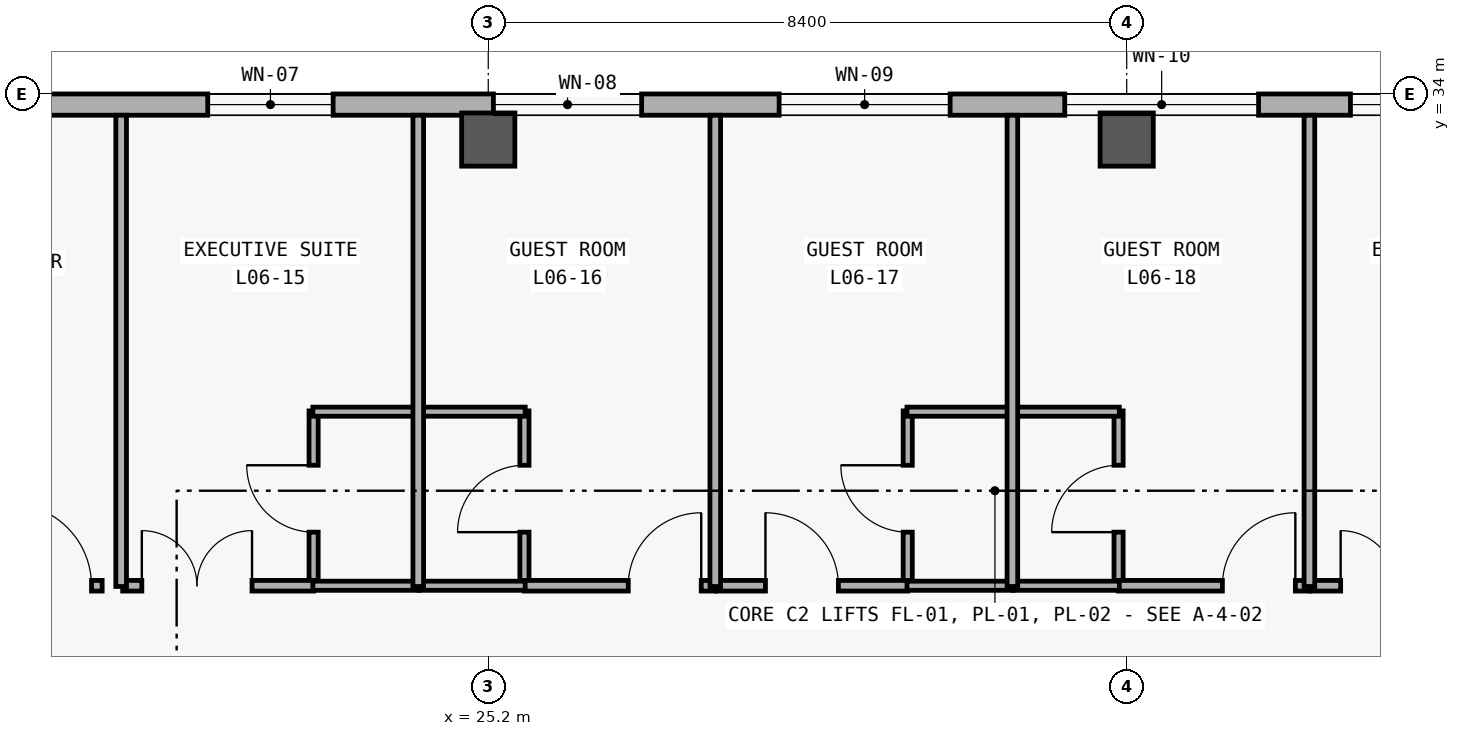
"""IFC4 building model, lengths in metres.
Left out: names, types, materials, properties, quantities, classifications, styles, units other than length and angle.
Written with IfcOpenShell. Run it as: python <this file> out.ifc"""

import sys

from ifc_helpers import new_model, si_unit, direction, frame, frame_2d, origin, origin_2d, place, context, subcontext, project, spatial, rectangle, extrude, element, fill, save


model = new_model("IFC4")
c1 = context("Model", 3, precision=1e-05, world=origin(), true_north=direction((0.0, 1.0)))
c2 = subcontext(c1, "Body", "Model", "MODEL_VIEW")
j1 = project(units=[si_unit("LENGTHUNIT", "METRE"), si_unit("PLANEANGLEUNIT", "RADIAN")], contexts=[c1])
p1 = place(None, origin())
s1 = spatial("IfcSite", under=j1, at=p1, CompositionType="ELEMENT")
p2 = place(p1, origin())
s2 = spatial("IfcBuilding", under=s1, at=p2, CompositionType="ELEMENT")
p3 = place(p2, frame((0.0, 0.0, 26.4)))
s3 = spatial("IfcBuildingStorey", under=s2, at=p3, CompositionType="ELEMENT", Elevation=26.4)
for number, where, z_axis, x_axis in (
    (1, (25.2, 33.4, 0.0), (0.0, 0.0, 1.0), (1.0, 0.0, 0.0)),
    (2, (33.6, 33.4, 0.0), (0.0, 0.0, 1.0), (1.0, 0.0, 0.0)),
):
    element("IfcColumn", number, at=place(p3, frame(where, z_axis=z_axis, x_axis=x_axis)), inside=s3, PredefinedType="COLUMN", context=c2, shape_type="SweptSolid", body=[
        extrude(rectangle(XDim=0.7, YDim=0.7, at=origin_2d()), origin(), (0.0, 0.0, 1.0), 3.6),
    ])
p4 = place(p3, frame((8.68, 33.86, 0.0), z_axis=(0.0, 0.0, 1.0), x_axis=(1.0, 0.0, 0.0)))
e3 = element("IfcWall", 3, at=p4, inside=s3, PredefinedType="SOLIDWALL", context=c2, shape_type="SweptSolid", body=[
    extrude(rectangle(XDim=66.64, YDim=0.28, at=frame_2d((33.32, 0.0))), origin(), (0.0, 0.0, 1.0), 3.32),
])
p5 = place(p4, frame((4.68, 0.0, 0.85)))
e4 = element("IfcOpeningElement", 4, at=p5, cuts=e3, PredefinedType="OPENING", context=c2, shape_type="SweptSolid", body=[
    extrude(rectangle(XDim=2.48, YDim=2.0, at=frame_2d((1.24, 1.0))), frame((0.0, 0.15, 0.0), z_axis=(0.0, -1.0, 0.0), x_axis=(1.0, 0.0, 0.0)), (0.0, 0.0, 1.0), 0.3),
])
p6 = place(p4, frame((12.829, 0.0, 0.85)))
e5 = element("IfcOpeningElement", 5, at=p6, cuts=e3, PredefinedType="OPENING", context=c2, shape_type="SweptSolid", body=[
    extrude(rectangle(XDim=1.65, YDim=1.75, at=frame_2d((0.825, 0.875))), frame((0.0, 0.15, 0.0), z_axis=(0.0, -1.0, 0.0), x_axis=(1.0, 0.0, 0.0)), (0.0, 0.0, 1.0), 0.3),
])
p7 = place(p4, frame((16.588, 0.0, 0.85)))
e6 = element("IfcOpeningElement", 6, at=p7, cuts=e3, PredefinedType="OPENING", context=c2, shape_type="SweptSolid", body=[
    extrude(rectangle(XDim=1.95, YDim=1.75, at=frame_2d((0.975, 0.875))), frame((0.0, 0.15, 0.0), z_axis=(0.0, -1.0, 0.0), x_axis=(1.0, 0.0, 0.0)), (0.0, 0.0, 1.0), 0.3),
])
p8 = place(p4, frame((20.347, 0.0, 0.85)))
e7 = element("IfcOpeningElement", 7, at=p8, cuts=e3, PredefinedType="OPENING", context=c2, shape_type="SweptSolid", body=[
    extrude(rectangle(XDim=2.25, YDim=1.75, at=frame_2d((1.125, 0.875))), frame((0.0, 0.15, 0.0), z_axis=(0.0, -1.0, 0.0), x_axis=(1.0, 0.0, 0.0)), (0.0, 0.0, 1.0), 0.3),
])
p9 = place(p4, frame((24.105, 0.0, 0.85)))
e8 = element("IfcOpeningElement", 8, at=p9, cuts=e3, PredefinedType="OPENING", context=c2, shape_type="SweptSolid", body=[
    extrude(rectangle(XDim=2.55, YDim=1.8, at=frame_2d((1.275, 0.9))), frame((0.0, 0.15, 0.0), z_axis=(0.0, -1.0, 0.0), x_axis=(1.0, 0.0, 0.0)), (0.0, 0.0, 1.0), 0.3),
])
p10 = place(p4, frame((27.864, 0.0, 0.85)))
e9 = element("IfcOpeningElement", 9, at=p10, cuts=e3, PredefinedType="OPENING", context=c2, shape_type="SweptSolid", body=[
    extrude(rectangle(XDim=2.85, YDim=1.85, at=frame_2d((1.425, 0.925))), frame((0.0, 0.15, 0.0), z_axis=(0.0, -1.0, 0.0), x_axis=(1.0, 0.0, 0.0)), (0.0, 0.0, 1.0), 0.3),
])
p11 = place(p4, frame((32.497, 0.0, 0.85)))
e10 = element("IfcOpeningElement", 10, at=p11, cuts=e3, PredefinedType="OPENING", context=c2, shape_type="SweptSolid", body=[
    extrude(rectangle(XDim=1.4, YDim=1.6, at=frame_2d((0.7, 0.8))), frame((0.0, 0.15, 0.0), z_axis=(0.0, -1.0, 0.0), x_axis=(1.0, 0.0, 0.0)), (0.0, 0.0, 1.0), 0.3),
])
p12 = place(p4, frame((36.306, 0.0, 0.85)))
e11 = element("IfcOpeningElement", 11, at=p12, cuts=e3, PredefinedType="OPENING", context=c2, shape_type="SweptSolid", body=[
    extrude(rectangle(XDim=1.6, YDim=1.6, at=frame_2d((0.8, 0.8))), frame((0.0, 0.15, 0.0), z_axis=(0.0, -1.0, 0.0), x_axis=(1.0, 0.0, 0.0)), (0.0, 0.0, 1.0), 0.3),
])
p13 = place(p4, frame((40.115, 0.0, 0.85)))
e12 = element("IfcOpeningElement", 12, at=p13, cuts=e3, PredefinedType="OPENING", context=c2, shape_type="SweptSolid", body=[
    extrude(rectangle(XDim=1.8, YDim=1.6, at=frame_2d((0.9, 0.8))), frame((0.0, 0.15, 0.0), z_axis=(0.0, -1.0, 0.0), x_axis=(1.0, 0.0, 0.0)), (0.0, 0.0, 1.0), 0.3),
])
p14 = place(p4, frame((43.923, 0.0, 0.85)))
e13 = element("IfcOpeningElement", 13, at=p14, cuts=e3, PredefinedType="OPENING", context=c2, shape_type="SweptSolid", body=[
    extrude(rectangle(XDim=2.0, YDim=1.65, at=frame_2d((1.0, 0.825))), frame((0.0, 0.15, 0.0), z_axis=(0.0, -1.0, 0.0), x_axis=(1.0, 0.0, 0.0)), (0.0, 0.0, 1.0), 0.3),
])
p15 = place(p4, frame((47.731, 0.0, 0.85)))
e14 = element("IfcOpeningElement", 14, at=p15, cuts=e3, PredefinedType="OPENING", context=c2, shape_type="SweptSolid", body=[
    extrude(rectangle(XDim=2.2, YDim=1.65, at=frame_2d((1.1, 0.825))), frame((0.0, 0.15, 0.0), z_axis=(0.0, -1.0, 0.0), x_axis=(1.0, 0.0, 0.0)), (0.0, 0.0, 1.0), 0.3),
])
p16 = place(p4, frame((51.44, 0.0, 0.85)))
e15 = element("IfcOpeningElement", 15, at=p16, cuts=e3, PredefinedType="OPENING", context=c2, shape_type="SweptSolid", body=[
    extrude(rectangle(XDim=2.6, YDim=2.2, at=frame_2d((1.3, 1.1))), frame((0.0, 0.15, 0.0), z_axis=(0.0, -1.0, 0.0), x_axis=(1.0, 0.0, 0.0)), (0.0, 0.0, 1.0), 0.3),
])
p17 = place(p4, frame((56.024, 0.0, 0.85)))
e16 = element("IfcOpeningElement", 16, at=p17, cuts=e3, PredefinedType="OPENING", context=c2, shape_type="SweptSolid", body=[
    extrude(rectangle(XDim=1.25, YDim=1.45, at=frame_2d((0.625, 0.725))), frame((0.0, 0.15, 0.0), z_axis=(0.0, -1.0, 0.0), x_axis=(1.0, 0.0, 0.0)), (0.0, 0.0, 1.0), 0.3),
])
p18 = place(p4, frame((59.882, 0.0, 0.85)))
e17 = element("IfcOpeningElement", 17, at=p18, cuts=e3, PredefinedType="OPENING", context=c2, shape_type="SweptSolid", body=[
    extrude(rectangle(XDim=1.35, YDim=1.55, at=frame_2d((0.675, 0.775))), frame((0.0, 0.15, 0.0), z_axis=(0.0, -1.0, 0.0), x_axis=(1.0, 0.0, 0.0)), (0.0, 0.0, 1.0), 0.3),
])
p19 = place(p4, frame((63.74, 0.0, 0.85)))
e18 = element("IfcOpeningElement", 18, at=p19, cuts=e3, PredefinedType="OPENING", context=c2, shape_type="SweptSolid", body=[
    extrude(rectangle(XDim=1.45, YDim=1.65, at=frame_2d((0.725, 0.825))), frame((0.0, 0.15, 0.0), z_axis=(0.0, -1.0, 0.0), x_axis=(1.0, 0.0, 0.0)), (0.0, 0.0, 1.0), 0.3),
])
p20 = place(p3, frame((22.902, 27.52, 0.0), z_axis=(0.0, 0.0, 1.0), x_axis=(0.0, 1.0, 0.0)))
e19 = element("IfcWall", 19, at=p20, inside=s3, PredefinedType="PARTITIONING", context=c2, shape_type="SweptSolid", body=[
    extrude(rectangle(XDim=2.31, YDim=0.12, at=frame_2d((1.155, 0.0))), origin(), (0.0, 0.0, 1.0), 2.48),
])
p21 = place(p20, frame((0.715, 0.0, 0.0)))
e20 = element("IfcOpeningElement", 20, at=p21, cuts=e19, PredefinedType="OPENING", context=c2, shape_type="SweptSolid", body=[
    extrude(rectangle(XDim=0.88, YDim=2.15, at=frame_2d((0.44, 1.075))), frame((0.0, 0.07, 0.0), z_axis=(0.0, -1.0, 0.0), x_axis=(1.0, 0.0, 0.0)), (0.0, 0.0, 1.0), 0.14),
])
p22 = place(p3, frame((25.676, 27.52, 0.0), z_axis=(0.0, 0.0, 1.0), x_axis=(0.0, 1.0, 0.0)))
e21 = element("IfcWall", 21, at=p22, inside=s3, PredefinedType="PARTITIONING", context=c2, shape_type="SweptSolid", body=[
    extrude(rectangle(XDim=2.31, YDim=0.12, at=frame_2d((1.155, 0.0))), origin(), (0.0, 0.0, 1.0), 2.48),
])
p23 = place(p22, frame((0.715, 0.0, 0.0)))
e22 = element("IfcOpeningElement", 22, at=p23, cuts=e21, PredefinedType="OPENING", context=c2, shape_type="SweptSolid", body=[
    extrude(rectangle(XDim=0.88, YDim=2.15, at=frame_2d((0.44, 1.075))), frame((0.0, 0.07, 0.0), z_axis=(0.0, -1.0, 0.0), x_axis=(1.0, 0.0, 0.0)), (0.0, 0.0, 1.0), 0.14),
])
p24 = place(p3, frame((30.719, 27.52, 0.0), z_axis=(0.0, 0.0, 1.0), x_axis=(0.0, 1.0, 0.0)))
e23 = element("IfcWall", 23, at=p24, inside=s3, PredefinedType="PARTITIONING", context=c2, shape_type="SweptSolid", body=[
    extrude(rectangle(XDim=2.31, YDim=0.12, at=frame_2d((1.155, 0.0))), origin(), (0.0, 0.0, 1.0), 2.48),
])
p25 = place(p24, frame((0.715, 0.0, 0.0)))
e24 = element("IfcOpeningElement", 24, at=p25, cuts=e23, PredefinedType="OPENING", context=c2, shape_type="SweptSolid", body=[
    extrude(rectangle(XDim=0.88, YDim=2.15, at=frame_2d((0.44, 1.075))), frame((0.0, 0.07, 0.0), z_axis=(0.0, -1.0, 0.0), x_axis=(1.0, 0.0, 0.0)), (0.0, 0.0, 1.0), 0.14),
])
p26 = place(p3, frame((33.493, 27.52, 0.0), z_axis=(0.0, 0.0, 1.0), x_axis=(0.0, 1.0, 0.0)))
e25 = element("IfcWall", 25, at=p26, inside=s3, PredefinedType="PARTITIONING", context=c2, shape_type="SweptSolid", body=[
    extrude(rectangle(XDim=2.31, YDim=0.12, at=frame_2d((1.155, 0.0))), origin(), (0.0, 0.0, 1.0), 2.48),
])
p27 = place(p26, frame((0.715, 0.0, 0.0)))
e26 = element("IfcOpeningElement", 26, at=p27, cuts=e25, PredefinedType="OPENING", context=c2, shape_type="SweptSolid", body=[
    extrude(rectangle(XDim=0.88, YDim=2.15, at=frame_2d((0.44, 1.075))), frame((0.0, 0.07, 0.0), z_axis=(0.0, -1.0, 0.0), x_axis=(1.0, 0.0, 0.0)), (0.0, 0.0, 1.0), 0.14),
])
p28 = place(p3, frame((16.96, 27.53, 0.0), z_axis=(0.0, 0.0, 1.0), x_axis=(1.0, 0.0, 0.0)))
e27 = element("IfcWall", 27, at=p28, inside=s3, PredefinedType="PARTITIONING", context=c2, shape_type="SweptSolid", body=[
    extrude(rectangle(XDim=3.16, YDim=0.14, at=frame_2d((1.58, 0.0))), origin(), (0.0, 0.0, 1.0), 2.48),
])
p29 = place(p28, frame((1.94, 0.0, 0.0)))
e28 = element("IfcOpeningElement", 28, at=p29, cuts=e27, PredefinedType="OPENING", context=c2, shape_type="SweptSolid", body=[
    extrude(rectangle(XDim=1.08, YDim=2.25, at=frame_2d((0.54, 1.125))), frame((0.0, 0.08, 0.0), z_axis=(0.0, -1.0, 0.0), x_axis=(1.0, 0.0, 0.0)), (0.0, 0.0, 1.0), 0.16),
])
p30 = place(p3, frame((20.39, 27.53, 0.0), z_axis=(0.0, 0.0, 1.0), x_axis=(1.0, 0.0, 0.0)))
e29 = element("IfcWall", 29, at=p30, inside=s3, PredefinedType="PARTITIONING", context=c2, shape_type="SweptSolid", body=[
    extrude(rectangle(XDim=2.512, YDim=0.14, at=frame_2d((1.256, 0.0))), origin(), (0.0, 0.0, 1.0), 2.48),
])
p31 = place(p30, frame((0.252, 0.0, 0.0)))
e30 = element("IfcOpeningElement", 30, at=p31, cuts=e29, PredefinedType="OPENING", context=c2, shape_type="SweptSolid", body=[
    extrude(rectangle(XDim=1.45, YDim=2.3, at=frame_2d((0.725, 1.15))), frame((0.0, 0.08, 0.0), z_axis=(0.0, -1.0, 0.0), x_axis=(1.0, 0.0, 0.0)), (0.0, 0.0, 1.0), 0.16),
])
p32 = place(p3, frame((25.676, 27.53, 0.0), z_axis=(0.0, 0.0, 1.0), x_axis=(1.0, 0.0, 0.0)))
e31 = element("IfcWall", 31, at=p32, inside=s3, PredefinedType="PARTITIONING", context=c2, shape_type="SweptSolid", body=[
    extrude(rectangle(XDim=2.511, YDim=0.14, at=frame_2d((1.255, 0.0))), origin(), (0.0, 0.0, 1.0), 2.48),
])
p33 = place(p32, frame((1.366, 0.0, 0.0)))
e32 = element("IfcOpeningElement", 32, at=p33, cuts=e31, PredefinedType="OPENING", context=c2, shape_type="SweptSolid", body=[
    extrude(rectangle(XDim=0.96, YDim=2.25, at=frame_2d((0.48, 1.125))), frame((0.0, 0.08, 0.0), z_axis=(0.0, -1.0, 0.0), x_axis=(1.0, 0.0, 0.0)), (0.0, 0.0, 1.0), 0.16),
])
p34 = place(p3, frame((28.207, 27.53, 0.0), z_axis=(0.0, 0.0, 1.0), x_axis=(1.0, 0.0, 0.0)))
e33 = element("IfcWall", 33, at=p34, inside=s3, PredefinedType="PARTITIONING", context=c2, shape_type="SweptSolid", body=[
    extrude(rectangle(XDim=2.512, YDim=0.14, at=frame_2d((1.256, 0.0))), origin(), (0.0, 0.0, 1.0), 2.48),
])
p35 = place(p34, frame((0.64, 0.0, 0.0)))
e34 = element("IfcOpeningElement", 34, at=p35, cuts=e33, PredefinedType="OPENING", context=c2, shape_type="SweptSolid", body=[
    extrude(rectangle(XDim=0.96, YDim=2.25, at=frame_2d((0.48, 1.125))), frame((0.0, 0.08, 0.0), z_axis=(0.0, -1.0, 0.0), x_axis=(1.0, 0.0, 0.0)), (0.0, 0.0, 1.0), 0.16),
])
p36 = place(p3, frame((33.493, 27.53, 0.0), z_axis=(0.0, 0.0, 1.0), x_axis=(1.0, 0.0, 0.0)))
e35 = element("IfcWall", 35, at=p36, inside=s3, PredefinedType="PARTITIONING", context=c2, shape_type="SweptSolid", body=[
    extrude(rectangle(XDim=2.511, YDim=0.14, at=frame_2d((1.255, 0.0))), origin(), (0.0, 0.0, 1.0), 2.48),
])
p37 = place(p36, frame((1.366, 0.0, 0.0)))
e36 = element("IfcOpeningElement", 36, at=p37, cuts=e35, PredefinedType="OPENING", context=c2, shape_type="SweptSolid", body=[
    extrude(rectangle(XDim=0.96, YDim=2.25, at=frame_2d((0.48, 1.125))), frame((0.0, 0.08, 0.0), z_axis=(0.0, -1.0, 0.0), x_axis=(1.0, 0.0, 0.0)), (0.0, 0.0, 1.0), 0.16),
])
p38 = place(p3, frame((36.024, 27.53, 0.0), z_axis=(0.0, 0.0, 1.0), x_axis=(1.0, 0.0, 0.0)))
e37 = element("IfcWall", 37, at=p38, inside=s3, PredefinedType="PARTITIONING", context=c2, shape_type="SweptSolid", body=[
    extrude(rectangle(XDim=2.512, YDim=0.14, at=frame_2d((1.256, 0.0))), origin(), (0.0, 0.0, 1.0), 2.48),
])
p39 = place(p38, frame((0.391, 0.0, 0.0)))
e38 = element("IfcOpeningElement", 38, at=p39, cuts=e37, PredefinedType="OPENING", context=c2, shape_type="SweptSolid", body=[
    extrude(rectangle(XDim=1.45, YDim=2.3, at=frame_2d((0.725, 1.15))), frame((0.0, 0.08, 0.0), z_axis=(0.0, -1.0, 0.0), x_axis=(1.0, 0.0, 0.0)), (0.0, 0.0, 1.0), 0.16),
])
for number, where, z_axis, x_axis in (
    (39, (22.892, 27.53, 0.0), (0.0, 0.0, 1.0), (1.0, 0.0, 0.0)),
    (40, (22.892, 29.82, 0.0), (0.0, 0.0, 1.0), (1.0, 0.0, 0.0)),
    (41, (24.289, 27.53, 0.0), (0.0, 0.0, 1.0), (1.0, 0.0, 0.0)),
    (42, (24.289, 29.82, 0.0), (0.0, 0.0, 1.0), (1.0, 0.0, 0.0)),
    (43, (30.709, 27.53, 0.0), (0.0, 0.0, 1.0), (1.0, 0.0, 0.0)),
    (44, (30.709, 29.82, 0.0), (0.0, 0.0, 1.0), (1.0, 0.0, 0.0)),
    (45, (32.106, 27.53, 0.0), (0.0, 0.0, 1.0), (1.0, 0.0, 0.0)),
    (46, (32.106, 29.82, 0.0), (0.0, 0.0, 1.0), (1.0, 0.0, 0.0)),
):
    element("IfcWall", number, at=place(p3, frame(where, z_axis=z_axis, x_axis=x_axis)), inside=s3, PredefinedType="PARTITIONING", context=c2, shape_type="SweptSolid", body=[
        extrude(rectangle(XDim=1.397, YDim=0.12, at=frame_2d((0.698, 0.0))), origin(), (0.0, 0.0, 1.0), 2.48),
    ])
for number, where, z_axis, x_axis in (
    (47, (20.37, 27.52, 0.0), (0.0, 0.0, 1.0), (0.0, 1.0, 0.0)),
    (48, (24.279, 27.52, 0.0), (0.0, 0.0, 1.0), (0.0, 1.0, 0.0)),
    (49, (28.187, 27.52, 0.0), (0.0, 0.0, 1.0), (0.0, 1.0, 0.0)),
    (50, (32.096, 27.52, 0.0), (0.0, 0.0, 1.0), (0.0, 1.0, 0.0)),
    (51, (36.004, 27.52, 0.0), (0.0, 0.0, 1.0), (0.0, 1.0, 0.0)),
):
    element("IfcWall", number, at=place(p3, frame(where, z_axis=z_axis, x_axis=x_axis)), inside=s3, PredefinedType="PARTITIONING", context=c2, shape_type="SweptSolid", body=[
        extrude(rectangle(XDim=6.2, YDim=0.14, at=frame_2d((3.1, 0.0))), origin(), (0.0, 0.0, 1.0), 2.48),
    ])
p40 = place(p6, origin())
e52 = element("IfcWindow", 52, at=p40, inside=s3, PartitioningType="SINGLE_PANEL", PredefinedType="WINDOW", context=c2, shape_type="SweptSolid", body=[
    extrude(rectangle(XDim=1.65, YDim=1.75, at=frame_2d((0.825, 0.875))), frame((0.0, 0.03, 0.0), z_axis=(0.0, -1.0, 0.0), x_axis=(1.0, 0.0, 0.0)), (0.0, 0.0, 1.0), 0.06),
])
fill(e5, e52)
p41 = place(p7, origin())
e53 = element("IfcWindow", 53, at=p41, inside=s3, PartitioningType="SINGLE_PANEL", PredefinedType="WINDOW", context=c2, shape_type="SweptSolid", body=[
    extrude(rectangle(XDim=1.95, YDim=1.75, at=frame_2d((0.975, 0.875))), frame((0.0, 0.03, 0.0), z_axis=(0.0, -1.0, 0.0), x_axis=(1.0, 0.0, 0.0)), (0.0, 0.0, 1.0), 0.06),
])
fill(e6, e53)
p42 = place(p8, origin())
e54 = element("IfcWindow", 54, at=p42, inside=s3, PartitioningType="SINGLE_PANEL", PredefinedType="WINDOW", context=c2, shape_type="SweptSolid", body=[
    extrude(rectangle(XDim=2.25, YDim=1.75, at=frame_2d((1.125, 0.875))), frame((0.0, 0.03, 0.0), z_axis=(0.0, -1.0, 0.0), x_axis=(1.0, 0.0, 0.0)), (0.0, 0.0, 1.0), 0.06),
])
fill(e7, e54)
p43 = place(p9, origin())
e55 = element("IfcWindow", 55, at=p43, inside=s3, PartitioningType="SINGLE_PANEL", PredefinedType="WINDOW", context=c2, shape_type="SweptSolid", body=[
    extrude(rectangle(XDim=2.55, YDim=1.8, at=frame_2d((1.275, 0.9))), frame((0.0, 0.03, 0.0), z_axis=(0.0, -1.0, 0.0), x_axis=(1.0, 0.0, 0.0)), (0.0, 0.0, 1.0), 0.06),
])
fill(e8, e55)
p44 = place(p10, origin())
e56 = element("IfcWindow", 56, at=p44, inside=s3, PartitioningType="SINGLE_PANEL", PredefinedType="WINDOW", context=c2, shape_type="SweptSolid", body=[
    extrude(rectangle(XDim=2.85, YDim=1.85, at=frame_2d((1.425, 0.925))), frame((0.0, 0.03, 0.0), z_axis=(0.0, -1.0, 0.0), x_axis=(1.0, 0.0, 0.0)), (0.0, 0.0, 1.0), 0.06),
])
fill(e9, e56)
p45 = place(p21, origin())
e57 = element("IfcDoor", 57, at=p45, inside=s3, OperationType="SINGLE_SWING_RIGHT", PredefinedType="DOOR", context=c2, shape_type="SweptSolid", body=[
    extrude(rectangle(XDim=0.88, YDim=2.15, at=frame_2d((0.44, 1.075))), frame((0.0, 0.025, 0.0), z_axis=(0.0, -1.0, 0.0), x_axis=(1.0, 0.0, 0.0)), (0.0, 0.0, 1.0), 0.05),
])
fill(e20, e57)
p46 = place(p23, origin())
e58 = element("IfcDoor", 58, at=p46, inside=s3, OperationType="SINGLE_SWING_LEFT", PredefinedType="DOOR", context=c2, shape_type="SweptSolid", body=[
    extrude(rectangle(XDim=0.88, YDim=2.15, at=frame_2d((0.44, 1.075))), frame((0.0, 0.025, 0.0), z_axis=(0.0, -1.0, 0.0), x_axis=(1.0, 0.0, 0.0)), (0.0, 0.0, 1.0), 0.05),
])
fill(e22, e58)
p47 = place(p25, origin())
e59 = element("IfcDoor", 59, at=p47, inside=s3, OperationType="SINGLE_SWING_RIGHT", PredefinedType="DOOR", context=c2, shape_type="SweptSolid", body=[
    extrude(rectangle(XDim=0.88, YDim=2.15, at=frame_2d((0.44, 1.075))), frame((0.0, 0.025, 0.0), z_axis=(0.0, -1.0, 0.0), x_axis=(1.0, 0.0, 0.0)), (0.0, 0.0, 1.0), 0.05),
])
fill(e24, e59)
p48 = place(p27, origin())
e60 = element("IfcDoor", 60, at=p48, inside=s3, OperationType="SINGLE_SWING_LEFT", PredefinedType="DOOR", context=c2, shape_type="SweptSolid", body=[
    extrude(rectangle(XDim=0.88, YDim=2.15, at=frame_2d((0.44, 1.075))), frame((0.0, 0.025, 0.0), z_axis=(0.0, -1.0, 0.0), x_axis=(1.0, 0.0, 0.0)), (0.0, 0.0, 1.0), 0.05),
])
fill(e26, e60)
p49 = place(p29, origin())
e61 = element("IfcDoor", 61, at=p49, inside=s3, OperationType="SINGLE_SWING_LEFT", PredefinedType="DOOR", context=c2, shape_type="SweptSolid", body=[
    extrude(rectangle(XDim=1.08, YDim=2.25, at=frame_2d((0.54, 1.125))), frame((0.0, 0.025, 0.0), z_axis=(0.0, -1.0, 0.0), x_axis=(1.0, 0.0, 0.0)), (0.0, 0.0, 1.0), 0.05),
])
fill(e28, e61)
p50 = place(p31, origin())
e62 = element("IfcDoor", 62, at=p50, inside=s3, OperationType="DOUBLE_DOOR_SINGLE_SWING", PredefinedType="DOOR", context=c2, shape_type="SweptSolid", body=[
    extrude(rectangle(XDim=1.45, YDim=2.3, at=frame_2d((0.725, 1.15))), frame((0.0, 0.025, 0.0), z_axis=(0.0, -1.0, 0.0), x_axis=(1.0, 0.0, 0.0)), (0.0, 0.0, 1.0), 0.05),
])
fill(e30, e62)
p51 = place(p33, origin())
e63 = element("IfcDoor", 63, at=p51, inside=s3, OperationType="SINGLE_SWING_RIGHT", PredefinedType="DOOR", context=c2, shape_type="SweptSolid", body=[
    extrude(rectangle(XDim=0.96, YDim=2.25, at=frame_2d((0.48, 1.125))), frame((0.0, 0.025, 0.0), z_axis=(0.0, -1.0, 0.0), x_axis=(1.0, 0.0, 0.0)), (0.0, 0.0, 1.0), 0.05),
])
fill(e32, e63)
p52 = place(p35, origin())
e64 = element("IfcDoor", 64, at=p52, inside=s3, OperationType="SINGLE_SWING_LEFT", PredefinedType="DOOR", context=c2, shape_type="SweptSolid", body=[
    extrude(rectangle(XDim=0.96, YDim=2.25, at=frame_2d((0.48, 1.125))), frame((0.0, 0.025, 0.0), z_axis=(0.0, -1.0, 0.0), x_axis=(1.0, 0.0, 0.0)), (0.0, 0.0, 1.0), 0.05),
])
fill(e34, e64)
p53 = place(p37, origin())
e65 = element("IfcDoor", 65, at=p53, inside=s3, OperationType="SINGLE_SWING_RIGHT", PredefinedType="DOOR", context=c2, shape_type="SweptSolid", body=[
    extrude(rectangle(XDim=0.96, YDim=2.25, at=frame_2d((0.48, 1.125))), frame((0.0, 0.025, 0.0), z_axis=(0.0, -1.0, 0.0), x_axis=(1.0, 0.0, 0.0)), (0.0, 0.0, 1.0), 0.05),
])
fill(e36, e65)
p54 = place(p39, origin())
e66 = element("IfcDoor", 66, at=p54, inside=s3, OperationType="DOUBLE_DOOR_SINGLE_SWING", PredefinedType="DOOR", context=c2, shape_type="SweptSolid", body=[
    extrude(rectangle(XDim=1.45, YDim=2.3, at=frame_2d((0.725, 1.15))), frame((0.0, 0.025, 0.0), z_axis=(0.0, -1.0, 0.0), x_axis=(1.0, 0.0, 0.0)), (0.0, 0.0, 1.0), 0.05),
])
fill(e38, e66)
save(model, sys.argv[1])
